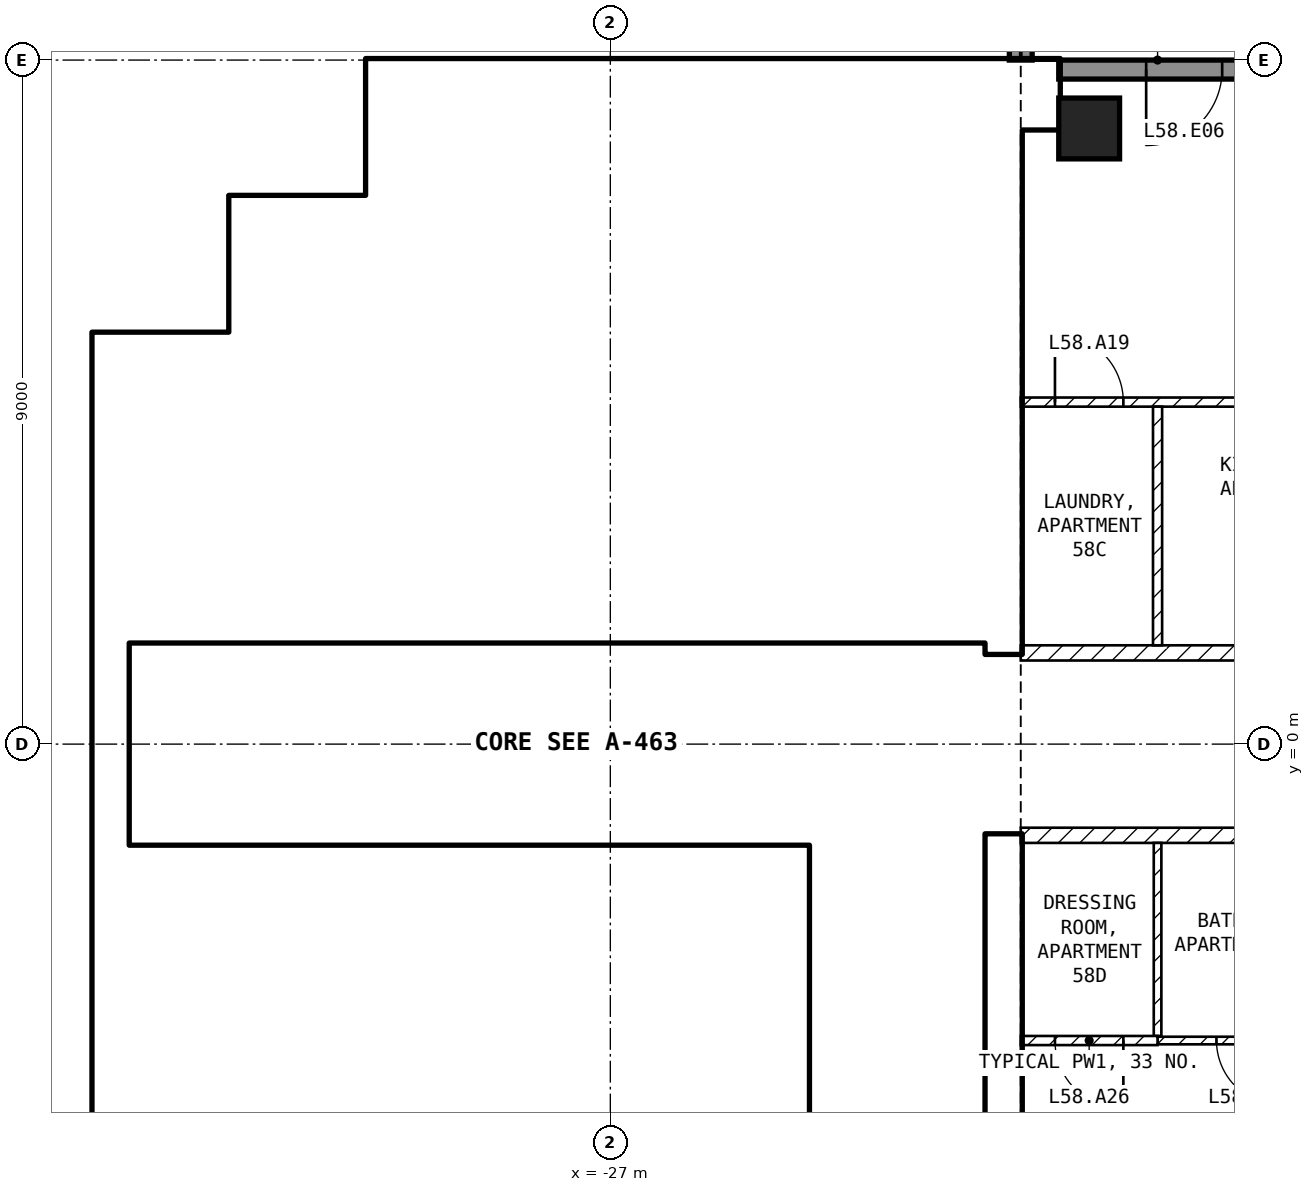
"""IFC4 building model, lengths in metres.
Left out: names, types, materials, properties, quantities, classifications, styles, units other than length and angle.
Written with IfcOpenShell. Run it as: python <this file> out.ifc"""

import sys

from ifc_helpers import new_model, si_unit, direction, frame, frame_2d, origin, origin_2d, place, context, subcontext, project, spatial, rectangle, extrude, element, fill, save


model = new_model("IFC4")
c1 = context("Model", 3, precision=1e-05, world=origin(), true_north=direction((0.0, 1.0)))
c2 = subcontext(c1, "Body", "Model", "MODEL_VIEW")
j1 = project(units=[si_unit("LENGTHUNIT", "METRE"), si_unit("PLANEANGLEUNIT", "RADIAN")], contexts=[c1])
p1 = place(None, origin())
s1 = spatial("IfcSite", under=j1, at=p1, CompositionType="ELEMENT")
p2 = place(p1, origin())
s2 = spatial("IfcBuilding", under=s1, at=p2, CompositionType="ELEMENT")
p3 = place(p2, frame((0.0, 0.0, 232.5)))
s3 = spatial("IfcBuildingStorey", under=s2, at=p3, CompositionType="ELEMENT", Elevation=232.5)
p4 = place(p3, frame((-20.7, 8.1, -0.25), z_axis=(0.0, 0.0, 1.0), x_axis=(1.0, 0.0, 0.0)))
e1 = element("IfcColumn", 1, at=p4, inside=s3, PredefinedType="COLUMN", context=c2, shape_type="SweptSolid", body=[
    extrude(rectangle(XDim=0.8, YDim=0.8, at=origin_2d()), origin(), (0.0, 0.0, 1.0), 3.5),
])
p5 = place(p3, frame((-17.8, 8.875, 0.0), z_axis=(0.0, 0.0, 1.0), x_axis=(-1.0, 0.0, 0.0)))
e2 = element("IfcWall", 2, at=p5, inside=s3, PredefinedType="SOLIDWALL", context=c2, shape_type="SweptSolid", body=[
    extrude(rectangle(XDim=3.3, YDim=0.25, at=frame_2d((1.65, 0.0))), origin(), (0.0, 0.0, 1.0), 3.25),
])
p6 = place(p5, frame((1.15, 0.0, 0.0)))
e3 = element("IfcOpeningElement", 3, at=p6, cuts=e2, PredefinedType="OPENING", context=c2, shape_type="SweptSolid", body=[
    extrude(rectangle(XDim=1.0, YDim=2.4, at=frame_2d((0.5, 1.2))), frame((0.0, 0.135, 0.0), z_axis=(0.0, -1.0, 0.0), x_axis=(1.0, 0.0, 0.0)), (0.0, 0.0, 1.0), 0.27),
])
p7 = place(p3, frame((-21.6, 9.0, 0.0), z_axis=(0.0, 0.0, 1.0), x_axis=(0.0, 1.0, 0.0)))
e4 = element("IfcWall", 4, at=p7, inside=s3, PredefinedType="SOLIDWALL", context=c2, shape_type="SweptSolid", body=[
    extrude(rectangle(XDim=2.7, YDim=0.3, at=frame_2d((1.35, 0.0))), origin(), (0.0, 0.0, 1.0), 3.25),
])
p8 = place(p3, frame((-33.575, -4.95, 0.0), z_axis=(0.0, 0.0, 1.0), x_axis=(0.0, 1.0, 0.0)))
e5 = element("IfcWall", 5, at=p8, inside=s3, PredefinedType="SHEAR", context=c2, shape_type="SweptSolid", body=[
    extrude(rectangle(XDim=10.35, YDim=0.45, at=frame_2d((5.175, 0.0))), origin(), (0.0, 0.0, 1.0), 3.25),
])
for number, where, z_axis, x_axis in (
    (6, (-33.35, 5.175, 0.0), (0.0, 0.0, 1.0), (1.0, 0.0, 0.0)),
    (7, (-31.775, 5.4, 0.0), (0.0, 0.0, 1.0), (0.0, 1.0, 0.0)),
    (8, (-31.55, 6.975, 0.0), (0.0, 0.0, 1.0), (1.0, 0.0, 0.0)),
    (9, (-29.975, 7.2, 0.0), (0.0, 0.0, 1.0), (0.0, 1.0, 0.0)),
):
    element("IfcWall", number, at=place(p3, frame(where, z_axis=z_axis, x_axis=x_axis)), inside=s3, PredefinedType="SHEAR", context=c2, shape_type="SweptSolid", body=[
        extrude(rectangle(XDim=1.8, YDim=0.45, at=frame_2d((0.9, 0.0))), origin(), (0.0, 0.0, 1.0), 3.25),
    ])
p9 = place(p3, frame((-29.75, 8.55, 0.0), z_axis=(0.0, 0.0, 1.0), x_axis=(1.0, 0.0, 0.0)))
e10 = element("IfcWall", 10, at=p9, inside=s3, PredefinedType="SHEAR", context=c2, shape_type="SweptSolid", body=[
    extrude(rectangle(XDim=8.65, YDim=0.9, at=frame_2d((4.325, 0.0))), origin(), (0.0, 0.0, 1.0), 3.25),
])
for number, where, z_axis, x_axis in (
    (11, (-21.825, -8.1, 0.0), (0.0, 0.0, 1.0), (0.0, 1.0, 0.0)),
    (12, (-21.825, 1.2, 0.0), (0.0, 0.0, 1.0), (0.0, 1.0, 0.0)),
):
    element("IfcWall", number, at=place(p3, frame(where, z_axis=z_axis, x_axis=x_axis)), inside=s3, PredefinedType="SHEAR", context=c2, shape_type="SweptSolid", body=[
        extrude(rectangle(XDim=6.9, YDim=0.45, at=frame_2d((3.45, 0.0))), origin(), (0.0, 0.0, 1.0), 3.25),
    ])
p10 = place(p3, frame((-33.35, 1.45, 0.0), z_axis=(0.0, 0.0, 1.0), x_axis=(1.0, 0.0, 0.0)))
e13 = element("IfcWall", 13, at=p10, inside=s3, PredefinedType="SOLIDWALL", context=c2, shape_type="SweptSolid", body=[
    extrude(rectangle(XDim=11.3, YDim=0.2, at=frame_2d((5.65, 0.0))), origin(), (0.0, 0.0, 1.0), 3.25),
])
p11 = place(p10, frame((9.55, 0.0, 0.0)))
e14 = element("IfcOpeningElement", 14, at=p11, cuts=e13, PredefinedType="OPENING", context=c2, shape_type="SweptSolid", body=[
    extrude(rectangle(XDim=1.0, YDim=2.1, at=frame_2d((0.5, 1.05))), frame((0.0, 0.11, 0.0), z_axis=(0.0, -1.0, 0.0), x_axis=(1.0, 0.0, 0.0)), (0.0, 0.0, 1.0), 0.22),
])
p12 = place(p10, frame((7.05, 0.0, 0.0)))
e15 = element("IfcOpeningElement", 15, at=p12, cuts=e13, PredefinedType="OPENING", context=c2, shape_type="SweptSolid", body=[
    extrude(rectangle(XDim=1.0, YDim=2.1, at=frame_2d((0.5, 1.05))), frame((0.0, 0.11, 0.0), z_axis=(0.0, -1.0, 0.0), x_axis=(1.0, 0.0, 0.0)), (0.0, 0.0, 1.0), 0.22),
])
p13 = place(p10, frame((1.175, 0.0, 0.0)))
e16 = element("IfcOpeningElement", 16, at=p13, cuts=e13, PredefinedType="OPENING", context=c2, shape_type="SweptSolid", body=[
    extrude(rectangle(XDim=0.9, YDim=2.1, at=frame_2d((0.45, 1.05))), frame((0.0, 0.11, 0.0), z_axis=(0.0, -1.0, 0.0), x_axis=(1.0, 0.0, 0.0)), (0.0, 0.0, 1.0), 0.22),
])
p14 = place(p3, frame((-24.5, -5.05, 0.0), z_axis=(0.0, 0.0, 1.0), x_axis=(0.0, 1.0, 0.0)))
e17 = element("IfcWall", 17, at=p14, inside=s3, PredefinedType="SOLIDWALL", context=c2, shape_type="SweptSolid", body=[
    extrude(rectangle(XDim=3.7, YDim=0.2, at=frame_2d((1.85, 0.0))), origin(), (0.0, 0.0, 1.0), 3.25),
])
p15 = place(p14, frame((0.1, 0.0, 0.0)))
e18 = element("IfcOpeningElement", 18, at=p15, cuts=e17, PredefinedType="OPENING", context=c2, shape_type="SweptSolid", body=[
    extrude(rectangle(XDim=0.8, YDim=2.1, at=frame_2d((0.4, 1.05))), frame((0.0, 0.11, 0.0), z_axis=(0.0, -1.0, 0.0), x_axis=(1.0, 0.0, 0.0)), (0.0, 0.0, 1.0), 0.22),
])
p16 = place(p3, frame((-28.35, 5.15, 0.0), z_axis=(0.0, 0.0, 1.0), x_axis=(1.0, 0.0, 0.0)))
e19 = element("IfcWall", 19, at=p16, inside=s3, PredefinedType="SOLIDWALL", context=c2, shape_type="SweptSolid", body=[
    extrude(rectangle(XDim=6.3, YDim=0.2, at=frame_2d((3.15, 0.0))), origin(), (0.0, 0.0, 1.0), 3.25),
])
p17 = place(p16, frame((5.1, 0.0, 0.0)))
e20 = element("IfcOpeningElement", 20, at=p17, cuts=e19, PredefinedType="OPENING", context=c2, shape_type="SweptSolid", body=[
    extrude(rectangle(XDim=1.0, YDim=2.1, at=frame_2d((0.5, 1.05))), frame((0.0, 0.11, 0.0), z_axis=(0.0, -1.0, 0.0), x_axis=(1.0, 0.0, 0.0)), (0.0, 0.0, 1.0), 0.22),
])
p18 = place(p3, frame((-28.25, 5.25, 0.0), z_axis=(0.0, 0.0, 1.0), x_axis=(0.0, 1.0, 0.0)))
e21 = element("IfcWall", 21, at=p18, inside=s3, PredefinedType="SOLIDWALL", context=c2, shape_type="SweptSolid", body=[
    extrude(rectangle(XDim=2.85, YDim=0.2, at=frame_2d((1.425, 0.0))), origin(), (0.0, 0.0, 1.0), 3.25),
])
p19 = place(p3, frame((-33.35, -1.45, 0.0), z_axis=(0.0, 0.0, 1.0), x_axis=(1.0, 0.0, 0.0)))
e22 = element("IfcWall", 22, at=p19, inside=s3, PredefinedType="SOLIDWALL", context=c2, shape_type="SweptSolid", body=[
    extrude(rectangle(XDim=8.75, YDim=0.2, at=frame_2d((4.375, 0.0))), origin(), (0.0, 0.0, 1.0), 3.25),
])
p20 = place(p19, frame((7.35, 0.0, 0.0)))
e23 = element("IfcOpeningElement", 23, at=p20, cuts=e22, PredefinedType="OPENING", context=c2, shape_type="SweptSolid", body=[
    extrude(rectangle(XDim=1.0, YDim=2.1, at=frame_2d((0.5, 1.05))), frame((0.0, 0.11, 0.0), z_axis=(0.0, -1.0, 0.0), x_axis=(1.0, 0.0, 0.0)), (0.0, 0.0, 1.0), 0.22),
])
p21 = place(p19, frame((5.35, 0.0, 0.0)))
e24 = element("IfcOpeningElement", 24, at=p21, cuts=e22, PredefinedType="OPENING", context=c2, shape_type="SweptSolid", body=[
    extrude(rectangle(XDim=1.0, YDim=2.1, at=frame_2d((0.5, 1.05))), frame((0.0, 0.11, 0.0), z_axis=(0.0, -1.0, 0.0), x_axis=(1.0, 0.0, 0.0)), (0.0, 0.0, 1.0), 0.22),
])
p22 = place(p19, frame((3.35, 0.0, 0.0)))
e25 = element("IfcOpeningElement", 25, at=p22, cuts=e22, PredefinedType="OPENING", context=c2, shape_type="SweptSolid", body=[
    extrude(rectangle(XDim=1.0, YDim=2.1, at=frame_2d((0.5, 1.05))), frame((0.0, 0.11, 0.0), z_axis=(0.0, -1.0, 0.0), x_axis=(1.0, 0.0, 0.0)), (0.0, 0.0, 1.0), 0.22),
])
p23 = place(p19, frame((0.925, 0.0, 0.0)))
e26 = element("IfcOpeningElement", 26, at=p23, cuts=e22, PredefinedType="OPENING", context=c2, shape_type="SweptSolid", body=[
    extrude(rectangle(XDim=0.9, YDim=2.1, at=frame_2d((0.45, 1.05))), frame((0.0, 0.11, 0.0), z_axis=(0.0, -1.0, 0.0), x_axis=(1.0, 0.0, 0.0)), (0.0, 0.0, 1.0), 0.22),
])
p24 = place(p3, frame((-33.35, 3.95, 0.0), z_axis=(0.0, 0.0, 1.0), x_axis=(1.0, 0.0, 0.0)))
e27 = element("IfcWall", 27, at=p24, inside=s3, PredefinedType="SOLIDWALL", context=c2, shape_type="SweptSolid", body=[
    extrude(rectangle(XDim=6.15, YDim=0.2, at=frame_2d((3.075, 0.0))), origin(), (0.0, 0.0, 1.0), 3.25),
])
p25 = place(p3, frame((-33.35, -3.95, 0.0), z_axis=(0.0, 0.0, 1.0), x_axis=(1.0, 0.0, 0.0)))
e28 = element("IfcWall", 28, at=p25, inside=s3, PredefinedType="SOLIDWALL", context=c2, shape_type="SweptSolid", body=[
    extrude(rectangle(XDim=8.75, YDim=0.2, at=frame_2d((4.375, 0.0))), origin(), (0.0, 0.0, 1.0), 3.25),
])
p26 = place(p3, frame((-27.1, 1.55, 0.0), z_axis=(0.0, 0.0, 1.0), x_axis=(0.0, 1.0, 0.0)))
e29 = element("IfcWall", 29, at=p26, inside=s3, PredefinedType="SOLIDWALL", context=c2, shape_type="SweptSolid", body=[
    extrude(rectangle(XDim=3.5, YDim=0.2, at=frame_2d((1.75, 0.0))), origin(), (0.0, 0.0, 1.0), 3.25),
])
p27 = place(p26, frame((0.6, 0.0, 0.0)))
e30 = element("IfcOpeningElement", 30, at=p27, cuts=e29, PredefinedType="OPENING", context=c2, shape_type="SweptSolid", body=[
    extrude(rectangle(XDim=1.1, YDim=2.1, at=frame_2d((0.55, 1.05))), frame((0.0, 0.11, 0.0), z_axis=(0.0, -1.0, 0.0), x_axis=(1.0, 0.0, 0.0)), (0.0, 0.0, 1.0), 0.22),
])
p28 = place(p26, frame((2.6, 0.0, 0.0)))
e31 = element("IfcOpeningElement", 31, at=p28, cuts=e29, PredefinedType="OPENING", context=c2, shape_type="SweptSolid", body=[
    extrude(rectangle(XDim=0.8, YDim=2.1, at=frame_2d((0.4, 1.05))), frame((0.0, 0.11, 0.0), z_axis=(0.0, -1.0, 0.0), x_axis=(1.0, 0.0, 0.0)), (0.0, 0.0, 1.0), 0.22),
])
for number, where, z_axis, x_axis in (
    (32, (-30.0, 1.55, 0.0), (0.0, 0.0, 1.0), (0.0, 1.0, 0.0)),
    (33, (-26.5, -3.85, 0.0), (0.0, 0.0, 1.0), (0.0, 1.0, 0.0)),
    (34, (-28.5, -3.85, 0.0), (0.0, 0.0, 1.0), (0.0, 1.0, 0.0)),
    (35, (-30.5, -3.85, 0.0), (0.0, 0.0, 1.0), (0.0, 1.0, 0.0)),
):
    element("IfcWall", number, at=place(p3, frame(where, z_axis=z_axis, x_axis=x_axis)), inside=s3, PredefinedType="SOLIDWALL", context=c2, shape_type="SweptSolid", body=[
        extrude(rectangle(XDim=2.3, YDim=0.2, at=frame_2d((1.15, 0.0))), origin(), (0.0, 0.0, 1.0), 3.25),
    ])
p29 = place(p3, frame((-21.6, 1.2, 0.0), z_axis=(0.0, 0.0, 1.0), x_axis=(1.0, 0.0, 0.0)))
e36 = element("IfcWall", 36, at=p29, inside=s3, PredefinedType="PARTITIONING", context=c2, shape_type="SweptSolid", body=[
    extrude(rectangle(XDim=17.2, YDim=0.2, at=frame_2d((8.6, 0.0))), origin(), (0.0, 0.0, 1.0), 3.25),
])
p30 = place(p29, frame((6.1, 0.0, 0.0)))
e37 = element("IfcOpeningElement", 37, at=p30, cuts=e36, PredefinedType="OPENING", context=c2, shape_type="SweptSolid", body=[
    extrude(rectangle(XDim=1.0, YDim=2.1, at=frame_2d((0.5, 1.05))), frame((0.0, 0.11, 0.0), z_axis=(0.0, -1.0, 0.0), x_axis=(1.0, 0.0, 0.0)), (0.0, 0.0, 1.0), 0.22),
])
p31 = place(p3, frame((-4.4, -1.2, 0.0), z_axis=(0.0, 0.0, 1.0), x_axis=(-1.0, 0.0, 0.0)))
e38 = element("IfcWall", 38, at=p31, inside=s3, PredefinedType="PARTITIONING", context=c2, shape_type="SweptSolid", body=[
    extrude(rectangle(XDim=17.2, YDim=0.2, at=frame_2d((8.6, 0.0))), origin(), (0.0, 0.0, 1.0), 3.25),
])
p32 = place(p31, frame((5.9, 0.0, 0.0)))
e39 = element("IfcOpeningElement", 39, at=p32, cuts=e38, PredefinedType="OPENING", context=c2, shape_type="SweptSolid", body=[
    extrude(rectangle(XDim=1.0, YDim=2.1, at=frame_2d((0.5, 1.05))), frame((0.0, 0.11, 0.0), z_axis=(0.0, -1.0, 0.0), x_axis=(1.0, 0.0, 0.0)), (0.0, 0.0, 1.0), 0.22),
])
p33 = place(p3, frame((-21.6, 4.5, 0.0), z_axis=(0.0, 0.0, 1.0), x_axis=(1.0, 0.0, 0.0)))
e40 = element("IfcWall", 40, at=p33, inside=s3, PredefinedType="PARTITIONING", context=c2, shape_type="SweptSolid", body=[
    extrude(rectangle(XDim=7.8, YDim=0.12, at=frame_2d((3.9, 0.0))), origin(), (0.0, 0.0, 1.0), 3.25),
])
p34 = place(p33, frame((0.45, 0.0, 0.0)))
e41 = element("IfcOpeningElement", 41, at=p34, cuts=e40, PredefinedType="OPENING", context=c2, shape_type="SweptSolid", body=[
    extrude(rectangle(XDim=0.9, YDim=2.1, at=frame_2d((0.45, 1.05))), frame((0.0, 0.07, 0.0), z_axis=(0.0, -1.0, 0.0), x_axis=(1.0, 0.0, 0.0)), (0.0, 0.0, 1.0), 0.14),
])
p35 = place(p33, frame((6.15, 0.0, 0.0)))
e42 = element("IfcOpeningElement", 42, at=p35, cuts=e40, PredefinedType="OPENING", context=c2, shape_type="SweptSolid", body=[
    extrude(rectangle(XDim=0.9, YDim=2.1, at=frame_2d((0.45, 1.05))), frame((0.0, 0.07, 0.0), z_axis=(0.0, -1.0, 0.0), x_axis=(1.0, 0.0, 0.0)), (0.0, 0.0, 1.0), 0.14),
])
p36 = place(p3, frame((-19.8, 1.3, 0.0), z_axis=(0.0, 0.0, 1.0), x_axis=(0.0, 1.0, 0.0)))
e43 = element("IfcWall", 43, at=p36, inside=s3, PredefinedType="PARTITIONING", context=c2, shape_type="SweptSolid", body=[
    extrude(rectangle(XDim=3.14, YDim=0.12, at=frame_2d((1.57, 0.0))), origin(), (0.0, 0.0, 1.0), 3.25),
])
p37 = place(p3, frame((-19.8, -3.84, 0.0), z_axis=(0.0, 0.0, 1.0), x_axis=(0.0, 1.0, 0.0)))
e44 = element("IfcWall", 44, at=p37, inside=s3, PredefinedType="PARTITIONING", context=c2, shape_type="SweptSolid", body=[
    extrude(rectangle(XDim=2.54, YDim=0.1, at=frame_2d((1.27, 0.0))), origin(), (0.0, 0.0, 1.0), 3.25),
])
p38 = place(p3, frame((-17.4, -3.9, 0.0), z_axis=(0.0, 0.0, 1.0), x_axis=(-1.0, 0.0, 0.0)))
e45 = element("IfcWall", 45, at=p38, inside=s3, PredefinedType="PARTITIONING", context=c2, shape_type="SweptSolid", body=[
    extrude(rectangle(XDim=2.4, YDim=0.1, at=frame_2d((1.2, 0.0))), origin(), (0.0, 0.0, 1.0), 3.25),
])
p39 = place(p38, frame((0.775, 0.0, 0.0)))
e46 = element("IfcOpeningElement", 46, at=p39, cuts=e45, PredefinedType="OPENING", context=c2, shape_type="SweptSolid", body=[
    extrude(rectangle(XDim=0.85, YDim=2.1, at=frame_2d((0.425, 1.05))), frame((0.0, 0.06, 0.0), z_axis=(0.0, -1.0, 0.0), x_axis=(1.0, 0.0, 0.0)), (0.0, 0.0, 1.0), 0.12),
])
p40 = place(p3, frame((-19.8, -3.9, 0.0), z_axis=(0.0, 0.0, 1.0), x_axis=(-1.0, 0.0, 0.0)))
e47 = element("IfcWall", 47, at=p40, inside=s3, PredefinedType="PARTITIONING", context=c2, shape_type="SweptSolid", body=[
    extrude(rectangle(XDim=1.8, YDim=0.12, at=frame_2d((0.9, 0.0))), origin(), (0.0, 0.0, 1.0), 3.25),
])
p41 = place(p40, frame((0.45, 0.0, 0.0)))
e48 = element("IfcOpeningElement", 48, at=p41, cuts=e47, PredefinedType="OPENING", context=c2, shape_type="SweptSolid", body=[
    extrude(rectangle(XDim=0.9, YDim=2.1, at=frame_2d((0.45, 1.05))), frame((0.0, 0.07, 0.0), z_axis=(0.0, -1.0, 0.0), x_axis=(1.0, 0.0, 0.0)), (0.0, 0.0, 1.0), 0.14),
])
p42 = place(p6, origin())
e49 = element("IfcDoor", 49, at=p42, inside=s3, OperationType="SINGLE_SWING_RIGHT", PredefinedType="DOOR", context=c2, shape_type="SweptSolid", body=[
    extrude(rectangle(XDim=1.0, YDim=2.4, at=frame_2d((0.5, 1.2))), frame((0.0, 0.025, 0.0), z_axis=(0.0, -1.0, 0.0), x_axis=(1.0, 0.0, 0.0)), (0.0, 0.0, 1.0), 0.05),
])
fill(e3, e49)
p43 = place(p20, origin())
e50 = element("IfcDoor", 50, at=p43, inside=s3, OperationType="DOUBLE_DOOR_SLIDING", PredefinedType="DOOR", context=c2, shape_type="SweptSolid", body=[
    extrude(rectangle(XDim=1.0, YDim=2.1, at=frame_2d((0.5, 1.05))), frame((0.0, 0.025, 0.0), z_axis=(0.0, -1.0, 0.0), x_axis=(1.0, 0.0, 0.0)), (0.0, 0.0, 1.0), 0.05),
])
fill(e23, e50)
p44 = place(p27, origin())
e51 = element("IfcDoor", 51, at=p44, inside=s3, OperationType="DOUBLE_DOOR_SLIDING", PredefinedType="DOOR", context=c2, shape_type="SweptSolid", body=[
    extrude(rectangle(XDim=1.1, YDim=2.1, at=frame_2d((0.55, 1.05))), frame((0.0, 0.025, 0.0), z_axis=(0.0, -1.0, 0.0), x_axis=(1.0, 0.0, 0.0)), (0.0, 0.0, 1.0), 0.05),
])
fill(e30, e51)
p45 = place(p21, origin())
e52 = element("IfcDoor", 52, at=p45, inside=s3, OperationType="DOUBLE_DOOR_SLIDING", PredefinedType="DOOR", context=c2, shape_type="SweptSolid", body=[
    extrude(rectangle(XDim=1.0, YDim=2.1, at=frame_2d((0.5, 1.05))), frame((0.0, 0.025, 0.0), z_axis=(0.0, -1.0, 0.0), x_axis=(1.0, 0.0, 0.0)), (0.0, 0.0, 1.0), 0.05),
])
fill(e24, e52)
p46 = place(p22, origin())
e53 = element("IfcDoor", 53, at=p46, inside=s3, OperationType="DOUBLE_DOOR_SLIDING", PredefinedType="DOOR", context=c2, shape_type="SweptSolid", body=[
    extrude(rectangle(XDim=1.0, YDim=2.1, at=frame_2d((0.5, 1.05))), frame((0.0, 0.025, 0.0), z_axis=(0.0, -1.0, 0.0), x_axis=(1.0, 0.0, 0.0)), (0.0, 0.0, 1.0), 0.05),
])
fill(e25, e53)
p47 = place(p17, origin())
e54 = element("IfcDoor", 54, at=p47, inside=s3, OperationType="SINGLE_SWING_LEFT", PredefinedType="DOOR", context=c2, shape_type="SweptSolid", body=[
    extrude(rectangle(XDim=1.0, YDim=2.1, at=frame_2d((0.5, 1.05))), frame((0.0, 0.025, 0.0), z_axis=(0.0, -1.0, 0.0), x_axis=(1.0, 0.0, 0.0)), (0.0, 0.0, 1.0), 0.05),
])
fill(e20, e54)
p48 = place(p11, origin())
e55 = element("IfcDoor", 55, at=p48, inside=s3, OperationType="SINGLE_SWING_LEFT", PredefinedType="DOOR", context=c2, shape_type="SweptSolid", body=[
    extrude(rectangle(XDim=1.0, YDim=2.1, at=frame_2d((0.5, 1.05))), frame((0.0, 0.025, 0.0), z_axis=(0.0, -1.0, 0.0), x_axis=(1.0, 0.0, 0.0)), (0.0, 0.0, 1.0), 0.05),
])
fill(e14, e55)
p49 = place(p15, origin())
e56 = element("IfcDoor", 56, at=p49, inside=s3, OperationType="SINGLE_SWING_LEFT", PredefinedType="DOOR", context=c2, shape_type="SweptSolid", body=[
    extrude(rectangle(XDim=0.8, YDim=2.1, at=frame_2d((0.4, 1.05))), frame((0.0, 0.025, 0.0), z_axis=(0.0, -1.0, 0.0), x_axis=(1.0, 0.0, 0.0)), (0.0, 0.0, 1.0), 0.05),
])
fill(e18, e56)
p50 = place(p12, origin())
e57 = element("IfcDoor", 57, at=p50, inside=s3, OperationType="SINGLE_SWING_LEFT", PredefinedType="DOOR", context=c2, shape_type="SweptSolid", body=[
    extrude(rectangle(XDim=1.0, YDim=2.1, at=frame_2d((0.5, 1.05))), frame((0.0, 0.025, 0.0), z_axis=(0.0, -1.0, 0.0), x_axis=(1.0, 0.0, 0.0)), (0.0, 0.0, 1.0), 0.05),
])
fill(e15, e57)
p51 = place(p28, origin())
e58 = element("IfcDoor", 58, at=p51, inside=s3, OperationType="SINGLE_SWING_LEFT", PredefinedType="DOOR", context=c2, shape_type="SweptSolid", body=[
    extrude(rectangle(XDim=0.8, YDim=2.1, at=frame_2d((0.4, 1.05))), frame((0.0, 0.025, 0.0), z_axis=(0.0, -1.0, 0.0), x_axis=(1.0, 0.0, 0.0)), (0.0, 0.0, 1.0), 0.05),
])
fill(e31, e58)
p52 = place(p13, origin())
e59 = element("IfcDoor", 59, at=p52, inside=s3, OperationType="SINGLE_SWING_LEFT", PredefinedType="DOOR", context=c2, shape_type="SweptSolid", body=[
    extrude(rectangle(XDim=0.9, YDim=2.1, at=frame_2d((0.45, 1.05))), frame((0.0, 0.025, 0.0), z_axis=(0.0, -1.0, 0.0), x_axis=(1.0, 0.0, 0.0)), (0.0, 0.0, 1.0), 0.05),
])
fill(e16, e59)
p53 = place(p23, origin())
e60 = element("IfcDoor", 60, at=p53, inside=s3, OperationType="SINGLE_SWING_LEFT", PredefinedType="DOOR", context=c2, shape_type="SweptSolid", body=[
    extrude(rectangle(XDim=0.9, YDim=2.1, at=frame_2d((0.45, 1.05))), frame((0.0, 0.025, 0.0), z_axis=(0.0, -1.0, 0.0), x_axis=(1.0, 0.0, 0.0)), (0.0, 0.0, 1.0), 0.05),
])
fill(e26, e60)
p54 = place(p34, origin())
e61 = element("IfcDoor", 61, at=p54, inside=s3, OperationType="SINGLE_SWING_LEFT", PredefinedType="DOOR", context=c2, shape_type="SweptSolid", body=[
    extrude(rectangle(XDim=0.9, YDim=2.1, at=frame_2d((0.45, 1.05))), frame((0.0, 0.025, 0.0), z_axis=(0.0, -1.0, 0.0), x_axis=(1.0, 0.0, 0.0)), (0.0, 0.0, 1.0), 0.05),
])
fill(e41, e61)
p55 = place(p39, origin())
e62 = element("IfcDoor", 62, at=p55, inside=s3, OperationType="SINGLE_SWING_LEFT", PredefinedType="DOOR", context=c2, shape_type="SweptSolid", body=[
    extrude(rectangle(XDim=0.85, YDim=2.1, at=frame_2d((0.425, 1.05))), frame((0.0, 0.025, 0.0), z_axis=(0.0, -1.0, 0.0), x_axis=(1.0, 0.0, 0.0)), (0.0, 0.0, 1.0), 0.05),
])
fill(e46, e62)
p56 = place(p41, origin())
e63 = element("IfcDoor", 63, at=p56, inside=s3, OperationType="SINGLE_SWING_LEFT", PredefinedType="DOOR", context=c2, shape_type="SweptSolid", body=[
    extrude(rectangle(XDim=0.9, YDim=2.1, at=frame_2d((0.45, 1.05))), frame((0.0, 0.025, 0.0), z_axis=(0.0, -1.0, 0.0), x_axis=(1.0, 0.0, 0.0)), (0.0, 0.0, 1.0), 0.05),
])
fill(e48, e63)
save(model, sys.argv[1])
